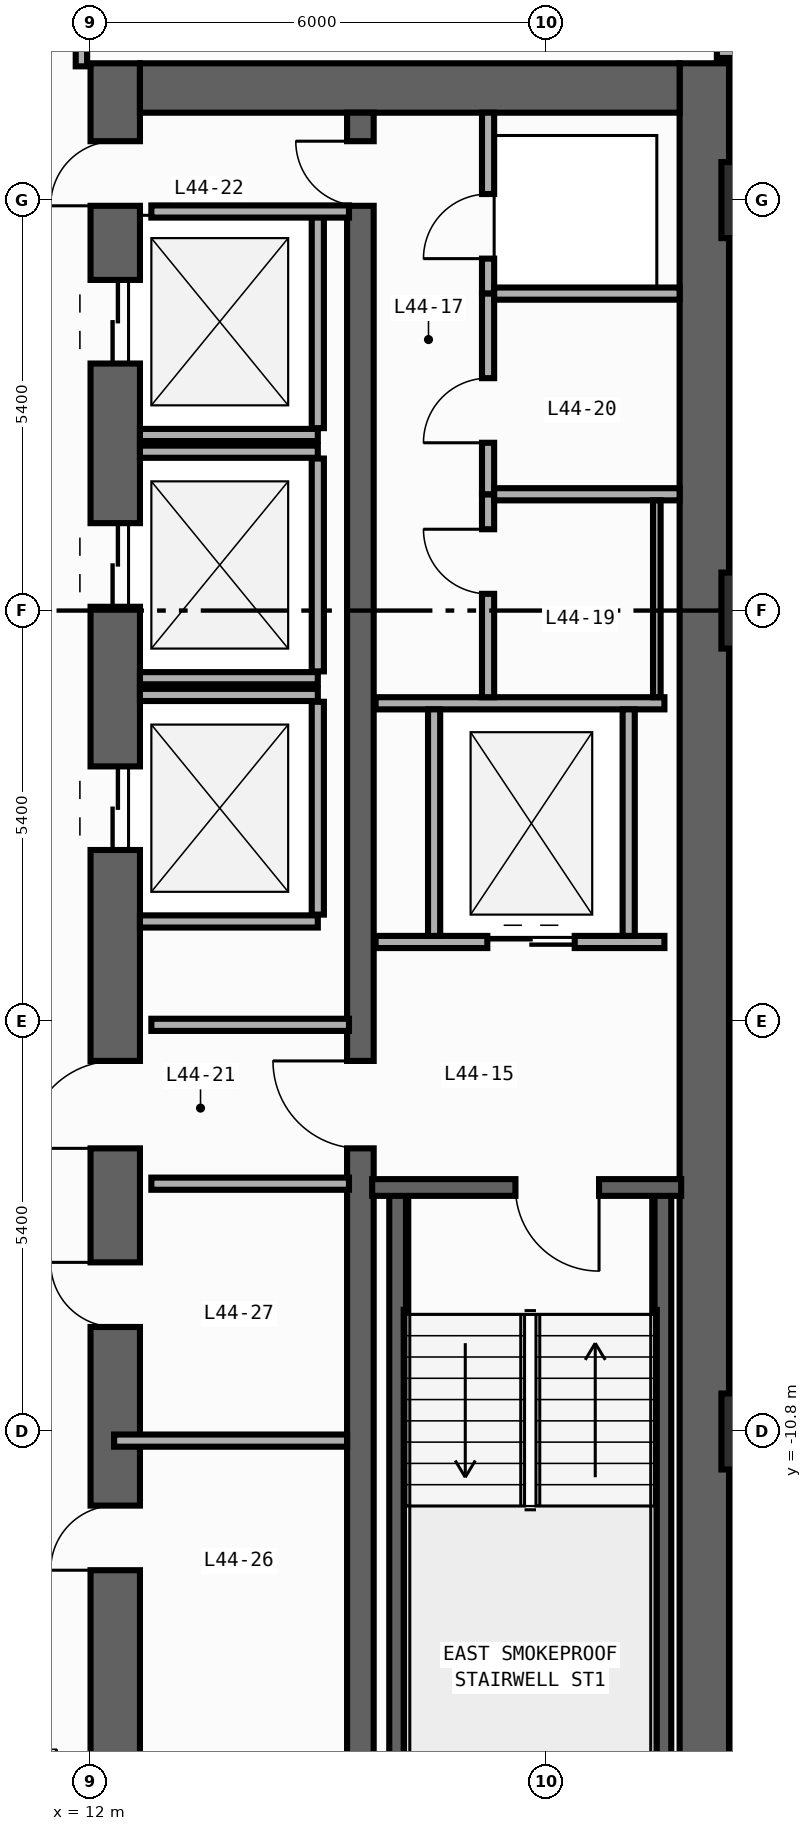
"""IFC4 building model, lengths in metres.
Left out: names, types, materials, properties, quantities, classifications, styles, units other than length and angle.
Written with IfcOpenShell. Run it as: python <this file> out.ifc"""

import sys

from ifc_helpers import new_model, si_unit, direction, frame, frame_2d, origin, origin_2d, place, context, subcontext, project, spatial, rectangle, extrude, element, fill, save


model = new_model("IFC4")
c1 = context("Model", 3, precision=1e-05, world=origin(), true_north=direction((0.0, 1.0)))
c2 = subcontext(c1, "Body", "Model", "MODEL_VIEW")
j1 = project(units=[si_unit("LENGTHUNIT", "METRE"), si_unit("PLANEANGLEUNIT", "RADIAN")], contexts=[c1])
p1 = place(None, origin())
s1 = spatial("IfcSite", under=j1, at=p1, CompositionType="ELEMENT")
p2 = place(p1, origin())
s2 = spatial("IfcBuilding", under=s1, at=p2, CompositionType="ELEMENT")
p3 = place(p2, frame((0.0, 0.0, 191.6)))
s3 = spatial("IfcBuildingStorey", under=s2, at=p3, CompositionType="ELEMENT", Elevation=191.6)
p4 = place(p3, frame((12.325, -19.8, 0.0), z_axis=(0.0, 0.0, 1.0), x_axis=(0.0, 1.0, 0.0)))
e1 = element("IfcWall", 1, at=p4, inside=s3, PredefinedType="SHEAR", context=c2, shape_type="SweptSolid", body=[
    extrude(rectangle(XDim=27.0, YDim=0.65, at=frame_2d((13.5, 0.0))), origin(), (0.0, 0.0, 1.0), 3.54),
])
p5 = place(p4, frame((23.05, 0.0, 0.0)))
e2 = element("IfcOpeningElement", 2, at=p5, cuts=e1, PredefinedType="OPENING", context=c2, shape_type="SweptSolid", body=[
    extrude(rectangle(XDim=1.1, YDim=2.2, at=frame_2d((0.55, 1.1))), frame((0.0, 0.335, 0.0), z_axis=(0.0, -1.0, 0.0), x_axis=(1.0, 0.0, 0.0)), (0.0, 0.0, 1.0), 0.67),
])
p6 = place(p4, frame((19.85, 0.0, 0.0)))
e3 = element("IfcOpeningElement", 3, at=p6, cuts=e1, PredefinedType="OPENING", context=c2, shape_type="SweptSolid", body=[
    extrude(rectangle(XDim=1.1, YDim=2.2, at=frame_2d((0.55, 1.1))), frame((0.0, 0.335, 0.0), z_axis=(0.0, -1.0, 0.0), x_axis=(1.0, 0.0, 0.0)), (0.0, 0.0, 1.0), 0.67),
])
p7 = place(p4, frame((16.65, 0.0, 0.0)))
e4 = element("IfcOpeningElement", 4, at=p7, cuts=e1, PredefinedType="OPENING", context=c2, shape_type="SweptSolid", body=[
    extrude(rectangle(XDim=1.1, YDim=2.2, at=frame_2d((0.55, 1.1))), frame((0.0, 0.335, 0.0), z_axis=(0.0, -1.0, 0.0), x_axis=(1.0, 0.0, 0.0)), (0.0, 0.0, 1.0), 0.67),
])
p8 = place(p4, frame((7.175, 0.0, 0.0)))
e5 = element("IfcOpeningElement", 5, at=p8, cuts=e1, PredefinedType="OPENING", context=c2, shape_type="SweptSolid", body=[
    extrude(rectangle(XDim=0.85, YDim=2.1, at=frame_2d((0.425, 1.05))), frame((0.0, 0.335, 0.0), z_axis=(0.0, -1.0, 0.0), x_axis=(1.0, 0.0, 0.0)), (0.0, 0.0, 1.0), 0.67),
])
p9 = place(p4, frame((10.375, 0.0, 0.0)))
e6 = element("IfcOpeningElement", 6, at=p9, cuts=e1, PredefinedType="OPENING", context=c2, shape_type="SweptSolid", body=[
    extrude(rectangle(XDim=0.85, YDim=2.1, at=frame_2d((0.425, 1.05))), frame((0.0, 0.335, 0.0), z_axis=(0.0, -1.0, 0.0), x_axis=(1.0, 0.0, 0.0)), (0.0, 0.0, 1.0), 0.67),
])
p10 = place(p4, frame((12.725, 0.0, 0.0)))
e7 = element("IfcOpeningElement", 7, at=p10, cuts=e1, PredefinedType="OPENING", context=c2, shape_type="SweptSolid", body=[
    extrude(rectangle(XDim=1.15, YDim=2.2, at=frame_2d((0.575, 1.1))), frame((0.0, 0.335, 0.0), z_axis=(0.0, -1.0, 0.0), x_axis=(1.0, 0.0, 0.0)), (0.0, 0.0, 1.0), 0.67),
])
p11 = place(p4, frame((25.125, 0.0, 0.0)))
e8 = element("IfcOpeningElement", 8, at=p11, cuts=e1, PredefinedType="OPENING", context=c2, shape_type="SweptSolid", body=[
    extrude(rectangle(XDim=0.85, YDim=2.1, at=frame_2d((0.425, 1.05))), frame((0.0, 0.335, 0.0), z_axis=(0.0, -1.0, 0.0), x_axis=(1.0, 0.0, 0.0)), (0.0, 0.0, 1.0), 0.67),
])
p12 = place(p3, frame((20.075, -19.8, 0.0), z_axis=(0.0, 0.0, 1.0), x_axis=(0.0, 1.0, 0.0)))
e9 = element("IfcWall", 9, at=p12, inside=s3, PredefinedType="SHEAR", context=c2, shape_type="SweptSolid", body=[
    extrude(rectangle(XDim=27.0, YDim=0.65, at=frame_2d((13.5, 0.0))), origin(), (0.0, 0.0, 1.0), 3.54),
])
p13 = place(p3, frame((12.65, 6.875, 0.0), z_axis=(0.0, 0.0, 1.0), x_axis=(1.0, 0.0, 0.0)))
e10 = element("IfcWall", 10, at=p13, inside=s3, PredefinedType="SHEAR", context=c2, shape_type="SweptSolid", body=[
    extrude(rectangle(XDim=7.1, YDim=0.65, at=frame_2d((3.55, 0.0))), origin(), (0.0, 0.0, 1.0), 3.54),
])
p14 = place(p3, frame((15.55, -19.15, 0.0), z_axis=(0.0, 0.0, 1.0), x_axis=(0.0, 1.0, 0.0)))
e11 = element("IfcWall", 11, at=p14, inside=s3, PredefinedType="SHEAR", context=c2, shape_type="SweptSolid", body=[
    extrude(rectangle(XDim=25.7, YDim=0.35, at=frame_2d((12.85, 0.0))), origin(), (0.0, 0.0, 1.0), 3.54),
])
p15 = place(p14, frame((12.075, 0.0, 0.0)))
e12 = element("IfcOpeningElement", 12, at=p15, cuts=e11, PredefinedType="OPENING", context=c2, shape_type="SweptSolid", body=[
    extrude(rectangle(XDim=1.15, YDim=2.2, at=frame_2d((0.575, 1.1))), frame((0.0, 0.185, 0.0), z_axis=(0.0, -1.0, 0.0), x_axis=(1.0, 0.0, 0.0)), (0.0, 0.0, 1.0), 0.37),
])
p16 = place(p14, frame((24.475, 0.0, 0.0)))
e13 = element("IfcOpeningElement", 13, at=p16, cuts=e11, PredefinedType="OPENING", context=c2, shape_type="SweptSolid", body=[
    extrude(rectangle(XDim=0.85, YDim=2.1, at=frame_2d((0.425, 1.05))), frame((0.0, 0.185, 0.0), z_axis=(0.0, -1.0, 0.0), x_axis=(1.0, 0.0, 0.0)), (0.0, 0.0, 1.0), 0.37),
])
for number, where, z_axis, x_axis in (
    (14, (16.04, -19.01, 0.0), (0.0, 0.0, 1.0), (0.0, 1.0, 0.0)),
    (15, (19.53, -19.01, 0.0), (0.0, 0.0, 1.0), (0.0, 1.0, 0.0)),
):
    element("IfcWall", number, at=place(p3, frame(where, z_axis=z_axis, x_axis=x_axis)), inside=s3, PredefinedType="SHEAR", context=c2, shape_type="SweptSolid", body=[
        extrude(rectangle(XDim=11.42, YDim=0.22, at=frame_2d((5.71, 0.0))), origin(), (0.0, 0.0, 1.0), 3.54),
    ])
p17 = place(p3, frame((19.77, -7.59, 0.0), z_axis=(0.0, 0.0, 1.0), x_axis=(-1.0, 0.0, 0.0)))
e16 = element("IfcWall", 16, at=p17, inside=s3, PredefinedType="SHEAR", context=c2, shape_type="SweptSolid", body=[
    extrude(rectangle(XDim=4.065, YDim=0.22, at=frame_2d((2.032, 0.0))), origin(), (0.0, 0.0, 1.0), 3.54),
])
p18 = place(p17, frame((1.08, 0.0, 0.0)))
e17 = element("IfcOpeningElement", 17, at=p18, cuts=e16, PredefinedType="OPENING", context=c2, shape_type="SweptSolid", body=[
    extrude(rectangle(XDim=1.1, YDim=2.2, at=frame_2d((0.55, 1.1))), frame((0.0, 0.12, 0.0), z_axis=(0.0, -1.0, 0.0), x_axis=(1.0, 0.0, 0.0)), (0.0, 0.0, 1.0), 0.24),
])
for number, where, z_axis, x_axis in (
    (18, (20.8, -10.8, 0.0), (0.0, 0.0, 1.0), (1.0, 0.0, 0.0)),
    (19, (20.8, 0.0, 0.0), (0.0, 0.0, 1.0), (1.0, 0.0, 0.0)),
    (20, (20.8, 5.4, 0.0), (0.0, 0.0, 1.0), (1.0, 0.0, 0.0)),
):
    element("IfcColumn", number, at=place(p3, frame(where, z_axis=z_axis, x_axis=x_axis)), inside=s3, PredefinedType="COLUMN", context=c2, shape_type="SweptSolid", body=[
        extrude(rectangle(XDim=1.0, YDim=1.0, at=origin_2d()), origin(), (0.0, 0.0, 1.0), 3.8),
    ])
p19 = place(p3, frame((12.65, 2.31, 0.0), z_axis=(0.0, 0.0, 1.0), x_axis=(1.0, 0.0, 0.0)))
e21 = element("IfcWall", 21, at=p19, inside=s3, PredefinedType="STANDARD", context=c2, shape_type="SweptSolid", body=[
    extrude(rectangle(XDim=2.34, YDim=0.16, at=frame_2d((1.17, 0.0))), origin(), (0.0, 0.0, 1.0), 3.54),
])
p20 = place(p3, frame((14.99, 2.4, 0.0), z_axis=(0.0, 0.0, 1.0), x_axis=(0.0, 1.0, 0.0)))
e22 = element("IfcWall", 22, at=p20, inside=s3, PredefinedType="STANDARD", context=c2, shape_type="SweptSolid", body=[
    extrude(rectangle(XDim=2.8, YDim=0.16, at=frame_2d((1.4, 0.0))), origin(), (0.0, 0.0, 1.0), 3.54),
])
for number, where, z_axis, x_axis in (
    (23, (12.65, -0.89, 0.0), (0.0, 0.0, 1.0), (1.0, 0.0, 0.0)),
    (24, (12.65, 2.09, 0.0), (0.0, 0.0, 1.0), (1.0, 0.0, 0.0)),
):
    element("IfcWall", number, at=place(p3, frame(where, z_axis=z_axis, x_axis=x_axis)), inside=s3, PredefinedType="STANDARD", context=c2, shape_type="SweptSolid", body=[
        extrude(rectangle(XDim=2.34, YDim=0.16, at=frame_2d((1.17, 0.0))), origin(), (0.0, 0.0, 1.0), 3.54),
    ])
p21 = place(p3, frame((14.99, -0.8, 0.0), z_axis=(0.0, 0.0, 1.0), x_axis=(0.0, 1.0, 0.0)))
e25 = element("IfcWall", 25, at=p21, inside=s3, PredefinedType="STANDARD", context=c2, shape_type="SweptSolid", body=[
    extrude(rectangle(XDim=2.8, YDim=0.16, at=frame_2d((1.4, 0.0))), origin(), (0.0, 0.0, 1.0), 3.54),
])
for number, where, z_axis, x_axis in (
    (26, (12.65, -4.09, 0.0), (0.0, 0.0, 1.0), (1.0, 0.0, 0.0)),
    (27, (12.65, -1.11, 0.0), (0.0, 0.0, 1.0), (1.0, 0.0, 0.0)),
):
    element("IfcWall", number, at=place(p3, frame(where, z_axis=z_axis, x_axis=x_axis)), inside=s3, PredefinedType="STANDARD", context=c2, shape_type="SweptSolid", body=[
        extrude(rectangle(XDim=2.34, YDim=0.16, at=frame_2d((1.17, 0.0))), origin(), (0.0, 0.0, 1.0), 3.54),
    ])
p22 = place(p3, frame((14.99, -4.0, 0.0), z_axis=(0.0, 0.0, 1.0), x_axis=(0.0, 1.0, 0.0)))
e28 = element("IfcWall", 28, at=p22, inside=s3, PredefinedType="STANDARD", context=c2, shape_type="SweptSolid", body=[
    extrude(rectangle(XDim=2.8, YDim=0.16, at=frame_2d((1.4, 0.0))), origin(), (0.0, 0.0, 1.0), 3.54),
])
p23 = place(p3, frame((15.75, -4.36, 0.0), z_axis=(0.0, 0.0, 1.0), x_axis=(1.0, 0.0, 0.0)))
e29 = element("IfcWall", 29, at=p23, inside=s3, PredefinedType="STANDARD", context=c2, shape_type="SweptSolid", body=[
    extrude(rectangle(XDim=3.8, YDim=0.16, at=frame_2d((1.9, 0.0))), origin(), (0.0, 0.0, 1.0), 3.54),
])
p24 = place(p23, frame((1.47, 0.0, 0.0)))
e30 = element("IfcOpeningElement", 30, at=p24, cuts=e29, PredefinedType="OPENING", context=c2, shape_type="SweptSolid", body=[
    extrude(rectangle(XDim=1.15, YDim=2.2, at=frame_2d((0.575, 1.1))), frame((0.0, 0.09, 0.0), z_axis=(0.0, -1.0, 0.0), x_axis=(1.0, 0.0, 0.0)), (0.0, 0.0, 1.0), 0.18),
])
p25 = place(p3, frame((15.75, -1.22, 0.0), z_axis=(0.0, 0.0, 1.0), x_axis=(1.0, 0.0, 0.0)))
e31 = element("IfcWall", 31, at=p25, inside=s3, PredefinedType="STANDARD", context=c2, shape_type="SweptSolid", body=[
    extrude(rectangle(XDim=3.8, YDim=0.16, at=frame_2d((1.9, 0.0))), origin(), (0.0, 0.0, 1.0), 3.54),
])
for number, where, z_axis, x_axis in (
    (32, (16.52, -4.28, 0.0), (0.0, 0.0, 1.0), (0.0, 1.0, 0.0)),
    (33, (19.08, -4.28, 0.0), (0.0, 0.0, 1.0), (0.0, 1.0, 0.0)),
):
    element("IfcWall", number, at=place(p3, frame(where, z_axis=z_axis, x_axis=x_axis)), inside=s3, PredefinedType="STANDARD", context=c2, shape_type="SweptSolid", body=[
        extrude(rectangle(XDim=2.98, YDim=0.16, at=frame_2d((1.49, 0.0))), origin(), (0.0, 0.0, 1.0), 3.54),
    ])
for number, where, z_axis, x_axis in (
    (34, (12.8, -5.45, 0.0), (0.0, 0.0, 1.0), (1.0, 0.0, 0.0)),
    (35, (12.8, -7.54, 0.0), (0.0, 0.0, 1.0), (1.0, 0.0, 0.0)),
    (36, (12.8, 5.25, 0.0), (0.0, 0.0, 1.0), (1.0, 0.0, 0.0)),
):
    element("IfcWall", number, at=place(p3, frame(where, z_axis=z_axis, x_axis=x_axis)), inside=s3, PredefinedType="STANDARD", context=c2, shape_type="SweptSolid", body=[
        extrude(rectangle(XDim=2.6, YDim=0.16, at=frame_2d((1.3, 0.0))), origin(), (0.0, 0.0, 1.0), 3.54),
    ])
p26 = place(p3, frame((17.23, 4.17, 0.0), z_axis=(0.0, 0.0, 1.0), x_axis=(0.0, 1.0, 0.0)))
e37 = element("IfcWall", 37, at=p26, inside=s3, PredefinedType="PARTITIONING", context=c2, shape_type="SweptSolid", body=[
    extrude(rectangle(XDim=2.38, YDim=0.16, at=frame_2d((1.19, 0.0))), origin(), (0.0, 0.0, 1.0), 3.54),
])
p27 = place(p26, frame((0.46, 0.0, 0.0)))
e38 = element("IfcOpeningElement", 38, at=p27, cuts=e37, PredefinedType="OPENING", context=c2, shape_type="SweptSolid", body=[
    extrude(rectangle(XDim=0.85, YDim=2.1, at=frame_2d((0.425, 1.05))), frame((0.0, 0.09, 0.0), z_axis=(0.0, -1.0, 0.0), x_axis=(1.0, 0.0, 0.0)), (0.0, 0.0, 1.0), 0.18),
])
p28 = place(p3, frame((17.23, -1.14, 0.0), z_axis=(0.0, 0.0, 1.0), x_axis=(0.0, 1.0, 0.0)))
e39 = element("IfcWall", 39, at=p28, inside=s3, PredefinedType="PARTITIONING", context=c2, shape_type="SweptSolid", body=[
    extrude(rectangle(XDim=2.67, YDim=0.16, at=frame_2d((1.335, 0.0))), origin(), (0.0, 0.0, 1.0), 3.54),
])
p29 = place(p28, frame((1.36, 0.0, 0.0)))
e40 = element("IfcOpeningElement", 40, at=p29, cuts=e39, PredefinedType="OPENING", context=c2, shape_type="SweptSolid", body=[
    extrude(rectangle(XDim=0.85, YDim=2.1, at=frame_2d((0.425, 1.05))), frame((0.0, 0.09, 0.0), z_axis=(0.0, -1.0, 0.0), x_axis=(1.0, 0.0, 0.0)), (0.0, 0.0, 1.0), 0.18),
])
p30 = place(p3, frame((17.23, 1.53, 0.0), z_axis=(0.0, 0.0, 1.0), x_axis=(0.0, 1.0, 0.0)))
e41 = element("IfcWall", 41, at=p30, inside=s3, PredefinedType="PARTITIONING", context=c2, shape_type="SweptSolid", body=[
    extrude(rectangle(XDim=2.64, YDim=0.16, at=frame_2d((1.32, 0.0))), origin(), (0.0, 0.0, 1.0), 3.54),
])
p31 = place(p30, frame((0.677, 0.0, 0.0)))
e42 = element("IfcOpeningElement", 42, at=p31, cuts=e41, PredefinedType="OPENING", context=c2, shape_type="SweptSolid", body=[
    extrude(rectangle(XDim=0.85, YDim=2.1, at=frame_2d((0.425, 1.05))), frame((0.0, 0.09, 0.0), z_axis=(0.0, -1.0, 0.0), x_axis=(1.0, 0.0, 0.0)), (0.0, 0.0, 1.0), 0.18),
])
for number, where, z_axis, x_axis in (
    (43, (17.31, 4.17, 0.0), (0.0, 0.0, 1.0), (1.0, 0.0, 0.0)),
    (44, (17.31, 1.53, 0.0), (0.0, 0.0, 1.0), (1.0, 0.0, 0.0)),
):
    element("IfcWall", number, at=place(p3, frame(where, z_axis=z_axis, x_axis=x_axis)), inside=s3, PredefinedType="PARTITIONING", context=c2, shape_type="SweptSolid", body=[
        extrude(rectangle(XDim=2.44, YDim=0.16, at=frame_2d((1.22, 0.0))), origin(), (0.0, 0.0, 1.0), 3.54),
    ])
p32 = place(p3, frame((12.31, -10.92, 0.0), z_axis=(0.0, 0.0, 1.0), x_axis=(1.0, 0.0, 0.0)))
e45 = element("IfcWall", 45, at=p32, inside=s3, PredefinedType="PARTITIONING", context=c2, shape_type="SweptSolid", body=[
    extrude(rectangle(XDim=3.065, YDim=0.16, at=frame_2d((1.532, 0.0))), origin(), (0.0, 0.0, 1.0), 2.952),
])
p33 = place(p3, frame((11.88, 7.16, 0.0), z_axis=(0.0, 0.0, 1.0), x_axis=(0.0, 1.0, 0.0)))
e46 = element("IfcWall", 46, at=p33, inside=s3, PredefinedType="PARTITIONING", context=c2, shape_type="SweptSolid", body=[
    extrude(rectangle(XDim=8.455, YDim=0.15, at=frame_2d((4.228, 0.0))), origin(), (0.0, 0.0, 1.0), 3.54),
])
p34 = place(p33, frame((0.46, 0.0, 0.0)))
e47 = element("IfcOpeningElement", 47, at=p34, cuts=e46, PredefinedType="OPENING", context=c2, shape_type="SweptSolid", body=[
    extrude(rectangle(XDim=0.9, YDim=2.15, at=frame_2d((0.45, 1.075))), frame((0.0, 0.085, 0.0), z_axis=(0.0, -1.0, 0.0), x_axis=(1.0, 0.0, 0.0)), (0.0, 0.0, 1.0), 0.17),
])
p35 = place(p3, frame((20.24, 7.34, 0.0), z_axis=(0.0, 0.0, 1.0), x_axis=(1.0, 0.0, 0.0)))
e48 = element("IfcWall", 48, at=p35, inside=s3, PredefinedType="PARTITIONING", context=c2, shape_type="SweptSolid", body=[
    extrude(rectangle(XDim=2.215, YDim=0.14, at=frame_2d((1.107, 0.0))), origin(), (0.0, 0.0, 1.0), 3.54),
])
p36 = place(p35, frame((0.905, 0.0, 0.0)))
e49 = element("IfcOpeningElement", 49, at=p36, cuts=e48, PredefinedType="OPENING", context=c2, shape_type="SweptSolid", body=[
    extrude(rectangle(XDim=0.85, YDim=2.1, at=frame_2d((0.425, 1.05))), frame((0.0, 0.08, 0.0), z_axis=(0.0, -1.0, 0.0), x_axis=(1.0, 0.0, 0.0)), (0.0, 0.0, 1.0), 0.16),
])
p37 = place(p3, frame((19.45, 1.45, 0.0), z_axis=(0.0, 0.0, 1.0), x_axis=(0.0, -1.0, 0.0)))
e50 = element("IfcWall", 50, at=p37, inside=s3, PredefinedType="PARTITIONING", context=c2, shape_type="SweptSolid", body=[
    extrude(rectangle(XDim=2.59, YDim=0.1, at=frame_2d((1.295, 0.0))), origin(), (0.0, 0.0, 1.0), 3.54),
])
p38 = place(p18, origin())
e51 = element("IfcDoor", 51, at=p38, inside=s3, OperationType="SINGLE_SWING_LEFT", PredefinedType="DOOR", context=c2, shape_type="SweptSolid", body=[
    extrude(rectangle(XDim=1.1, YDim=2.2, at=frame_2d((0.55, 1.1))), frame((0.0, 0.025, 0.0), z_axis=(0.0, -1.0, 0.0), x_axis=(1.0, 0.0, 0.0)), (0.0, 0.0, 1.0), 0.05),
])
fill(e17, e51)
p39 = place(p5, origin())
e52 = element("IfcDoor", 52, at=p39, inside=s3, OperationType="DOUBLE_DOOR_SLIDING", PredefinedType="DOOR", context=c2, shape_type="SweptSolid", body=[
    extrude(rectangle(XDim=1.1, YDim=2.2, at=frame_2d((0.55, 1.1))), frame((0.0, 0.025, 0.0), z_axis=(0.0, -1.0, 0.0), x_axis=(1.0, 0.0, 0.0)), (0.0, 0.0, 1.0), 0.05),
])
fill(e2, e52)
p40 = place(p6, origin())
e53 = element("IfcDoor", 53, at=p40, inside=s3, OperationType="DOUBLE_DOOR_SLIDING", PredefinedType="DOOR", context=c2, shape_type="SweptSolid", body=[
    extrude(rectangle(XDim=1.1, YDim=2.2, at=frame_2d((0.55, 1.1))), frame((0.0, 0.025, 0.0), z_axis=(0.0, -1.0, 0.0), x_axis=(1.0, 0.0, 0.0)), (0.0, 0.0, 1.0), 0.05),
])
fill(e3, e53)
p41 = place(p7, origin())
e54 = element("IfcDoor", 54, at=p41, inside=s3, OperationType="DOUBLE_DOOR_SLIDING", PredefinedType="DOOR", context=c2, shape_type="SweptSolid", body=[
    extrude(rectangle(XDim=1.1, YDim=2.2, at=frame_2d((0.55, 1.1))), frame((0.0, 0.025, 0.0), z_axis=(0.0, -1.0, 0.0), x_axis=(1.0, 0.0, 0.0)), (0.0, 0.0, 1.0), 0.05),
])
fill(e4, e54)
p42 = place(p8, origin())
e55 = element("IfcDoor", 55, at=p42, inside=s3, OperationType="SINGLE_SWING_LEFT", PredefinedType="DOOR", context=c2, shape_type="SweptSolid", body=[
    extrude(rectangle(XDim=0.85, YDim=2.1, at=frame_2d((0.425, 1.05))), frame((0.0, 0.025, 0.0), z_axis=(0.0, -1.0, 0.0), x_axis=(1.0, 0.0, 0.0)), (0.0, 0.0, 1.0), 0.05),
])
fill(e5, e55)
p43 = place(p9, origin())
e56 = element("IfcDoor", 56, at=p43, inside=s3, OperationType="SINGLE_SWING_RIGHT", PredefinedType="DOOR", context=c2, shape_type="SweptSolid", body=[
    extrude(rectangle(XDim=0.85, YDim=2.1, at=frame_2d((0.425, 1.05))), frame((0.0, 0.025, 0.0), z_axis=(0.0, -1.0, 0.0), x_axis=(1.0, 0.0, 0.0)), (0.0, 0.0, 1.0), 0.05),
])
fill(e6, e56)
p44 = place(p10, origin())
e57 = element("IfcDoor", 57, at=p44, inside=s3, OperationType="SINGLE_SWING_LEFT", PredefinedType="DOOR", context=c2, shape_type="SweptSolid", body=[
    extrude(rectangle(XDim=1.15, YDim=2.2, at=frame_2d((0.575, 1.1))), frame((0.0, 0.025, 0.0), z_axis=(0.0, -1.0, 0.0), x_axis=(1.0, 0.0, 0.0)), (0.0, 0.0, 1.0), 0.05),
])
fill(e7, e57)
p45 = place(p15, origin())
e58 = element("IfcDoor", 58, at=p45, inside=s3, OperationType="SINGLE_SWING_RIGHT", PredefinedType="DOOR", context=c2, shape_type="SweptSolid", body=[
    extrude(rectangle(XDim=1.15, YDim=2.2, at=frame_2d((0.575, 1.1))), frame((0.0, 0.025, 0.0), z_axis=(0.0, -1.0, 0.0), x_axis=(1.0, 0.0, 0.0)), (0.0, 0.0, 1.0), 0.05),
])
fill(e12, e58)
p46 = place(p11, origin())
e59 = element("IfcDoor", 59, at=p46, inside=s3, OperationType="SINGLE_SWING_LEFT", PredefinedType="DOOR", context=c2, shape_type="SweptSolid", body=[
    extrude(rectangle(XDim=0.85, YDim=2.1, at=frame_2d((0.425, 1.05))), frame((0.0, 0.025, 0.0), z_axis=(0.0, -1.0, 0.0), x_axis=(1.0, 0.0, 0.0)), (0.0, 0.0, 1.0), 0.05),
])
fill(e8, e59)
p47 = place(p16, origin())
e60 = element("IfcDoor", 60, at=p47, inside=s3, OperationType="SINGLE_SWING_RIGHT", PredefinedType="DOOR", context=c2, shape_type="SweptSolid", body=[
    extrude(rectangle(XDim=0.85, YDim=2.1, at=frame_2d((0.425, 1.05))), frame((0.0, 0.025, 0.0), z_axis=(0.0, -1.0, 0.0), x_axis=(1.0, 0.0, 0.0)), (0.0, 0.0, 1.0), 0.05),
])
fill(e13, e60)
p48 = place(p24, origin())
e61 = element("IfcDoor", 61, at=p48, inside=s3, OperationType="DOUBLE_DOOR_SLIDING", PredefinedType="DOOR", context=c2, shape_type="SweptSolid", body=[
    extrude(rectangle(XDim=1.15, YDim=2.2, at=frame_2d((0.575, 1.1))), frame((0.0, 0.025, 0.0), z_axis=(0.0, -1.0, 0.0), x_axis=(1.0, 0.0, 0.0)), (0.0, 0.0, 1.0), 0.05),
])
fill(e30, e61)
p49 = place(p27, origin())
e62 = element("IfcDoor", 62, at=p49, inside=s3, OperationType="SINGLE_SWING_LEFT", PredefinedType="DOOR", context=c2, shape_type="SweptSolid", body=[
    extrude(rectangle(XDim=0.85, YDim=2.1, at=frame_2d((0.425, 1.05))), frame((0.0, 0.025, 0.0), z_axis=(0.0, -1.0, 0.0), x_axis=(1.0, 0.0, 0.0)), (0.0, 0.0, 1.0), 0.05),
])
fill(e38, e62)
p50 = place(p29, origin())
e63 = element("IfcDoor", 63, at=p50, inside=s3, OperationType="SINGLE_SWING_RIGHT", PredefinedType="DOOR", context=c2, shape_type="SweptSolid", body=[
    extrude(rectangle(XDim=0.85, YDim=2.1, at=frame_2d((0.425, 1.05))), frame((0.0, 0.025, 0.0), z_axis=(0.0, -1.0, 0.0), x_axis=(1.0, 0.0, 0.0)), (0.0, 0.0, 1.0), 0.05),
])
fill(e40, e63)
p51 = place(p31, origin())
e64 = element("IfcDoor", 64, at=p51, inside=s3, OperationType="SINGLE_SWING_LEFT", PredefinedType="DOOR", context=c2, shape_type="SweptSolid", body=[
    extrude(rectangle(XDim=0.85, YDim=2.1, at=frame_2d((0.425, 1.05))), frame((0.0, 0.025, 0.0), z_axis=(0.0, -1.0, 0.0), x_axis=(1.0, 0.0, 0.0)), (0.0, 0.0, 1.0), 0.05),
])
fill(e42, e64)
save(model, sys.argv[1])
